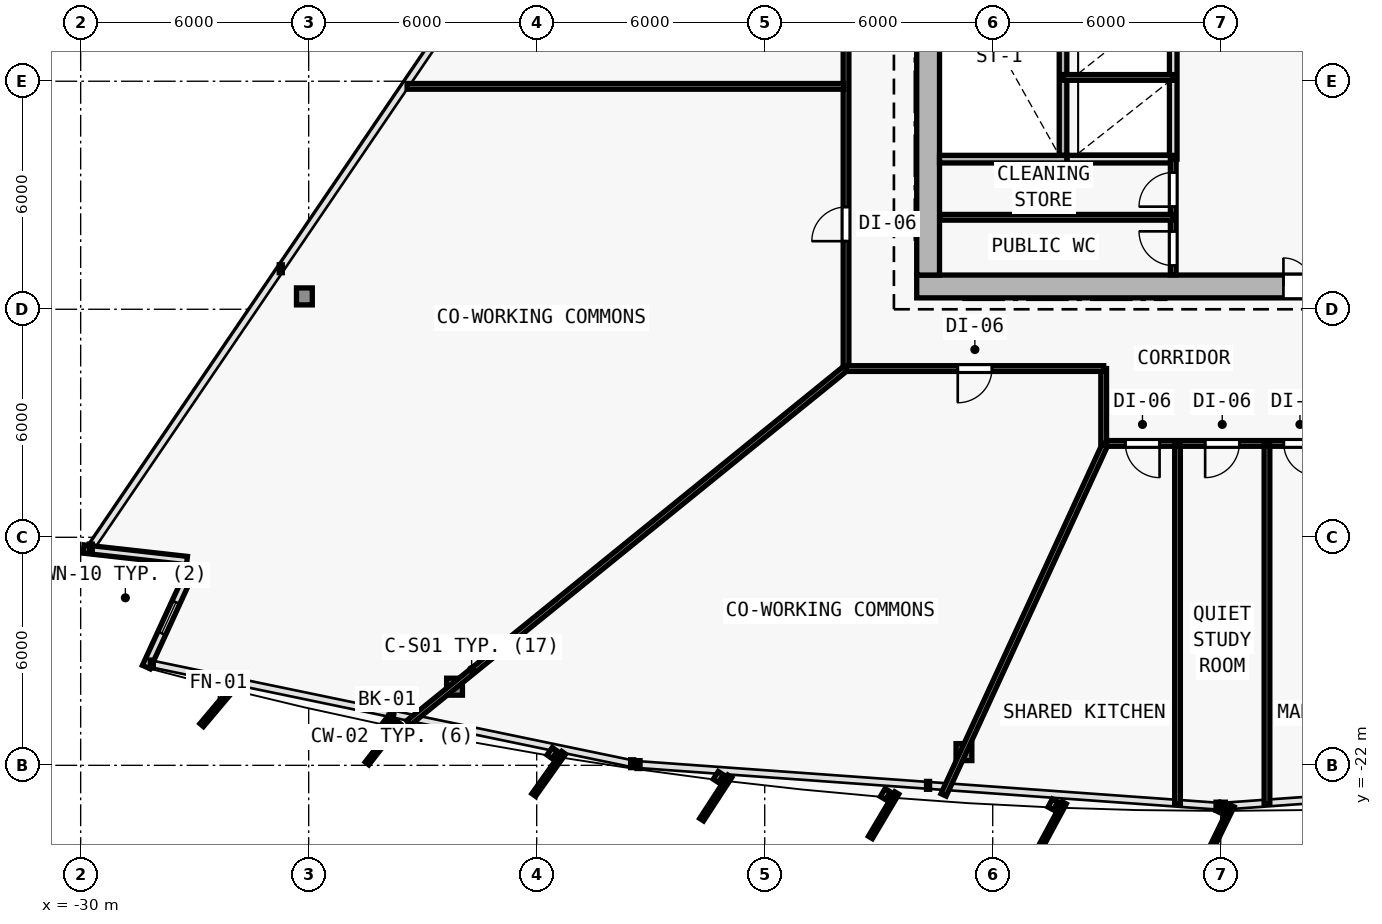
"""IFC4 building model, lengths in metres.
Left out: names, types, materials, properties, quantities, classifications, styles, units other than length and angle.
Written with IfcOpenShell. Run it as: python <this file> out.ifc"""

import sys

from ifc_helpers import new_model, si_unit, direction, frame, frame_2d, origin, origin_2d, place, context, subcontext, project, spatial, rectangle, i_section, extrude, element, fill, save


model = new_model("IFC4")
c1 = context("Model", 3, precision=1e-05, world=origin(), true_north=direction((0.0, 1.0)))
c2 = subcontext(c1, "Body", "Model", "MODEL_VIEW")
j1 = project(units=[si_unit("LENGTHUNIT", "METRE"), si_unit("PLANEANGLEUNIT", "RADIAN")], contexts=[c1])
p1 = place(None, origin())
s1 = spatial("IfcSite", under=j1, at=p1, CompositionType="ELEMENT")
p2 = place(p1, origin())
s2 = spatial("IfcBuilding", under=s1, at=p2, CompositionType="ELEMENT")
p3 = place(p2, frame((0.0, 0.0, 37.2)))
s3 = spatial("IfcBuildingStorey", under=s2, at=p3, CompositionType="ELEMENT", Elevation=37.2)
for number, where, z_axis, x_axis in (
    (1, (-7.7, -9.4, 0.0), (0.0, 0.0, 1.0), (1.0, 0.0, 0.0)),
    (2, (0.0, -9.4, 0.0), (0.0, 0.0, 1.0), (1.0, 0.0, 0.0)),
):
    element("IfcColumn", number, at=place(p3, frame(where, z_axis=z_axis, x_axis=x_axis)), inside=s3, PredefinedType="COLUMN", context=c2, shape_type="SweptSolid", body=[
        extrude(i_section(OverallWidth=0.416, OverallDepth=0.446, WebThickness=0.025, FlangeThickness=0.04, FilletRadius=0.015, at=origin_2d()), origin(), (0.0, 0.0, 1.0), 3.6),
    ])
p4 = place(p3, frame((-20.162, -19.931, 0.006), z_axis=(0.020664238418, 0.033511412961, 0.999224686671), x_axis=(-0.851183725565, 0.524867855115, 0.0)))
e3 = element("IfcColumn", 3, at=p4, inside=s3, PredefinedType="COLUMN", context=c2, shape_type="SweptSolid", body=[
    extrude(i_section(OverallWidth=0.416, OverallDepth=0.446, WebThickness=0.025, FlangeThickness=0.04, FilletRadius=0.015, at=origin_2d()), origin(), (0.0, 0.0, 1.0), 3.592),
])
p5 = place(p3, frame((-6.757, -21.652, 0.006), z_axis=(0.006934288159, 0.035283289748, 0.999353293441), x_axis=(-0.981229659911, 0.192842823335, 0.0)))
e4 = element("IfcColumn", 4, at=p5, inside=s3, PredefinedType="COLUMN", context=c2, shape_type="SweptSolid", body=[
    extrude(i_section(OverallWidth=0.416, OverallDepth=0.446, WebThickness=0.025, FlangeThickness=0.04, FilletRadius=0.015, at=origin_2d()), origin(), (0.0, 0.0, 1.0), 3.591),
])
p6 = place(p3, frame((-24.113, -9.662, 0.006), z_axis=(0.025224163578, 0.021620711639, 0.999447990843), x_axis=(-0.650791373456, 0.759256602365, 0.0)))
e5 = element("IfcColumn", 5, at=p6, inside=s3, PredefinedType="COLUMN", context=c2, shape_type="SweptSolid", body=[
    extrude(i_section(OverallWidth=0.416, OverallDepth=0.446, WebThickness=0.025, FlangeThickness=0.04, FilletRadius=0.015, at=origin_2d()), origin(), (0.0, 0.0, 1.0), 3.591),
])
p7 = place(p3, frame((-27.202, -16.612, 0.0), z_axis=(0.0, 0.0, 1.0), x_axis=(-0.993822658088, 0.110979837223, 0.0)))
e6 = element("IfcWall", 6, at=p7, inside=s3, PredefinedType="SOLIDWALL", context=c2, shape_type="SweptSolid", body=[
    extrude(rectangle(XDim=2.737, YDim=0.22, at=frame_2d((1.368, 0.0))), origin(), (0.0, 0.0, 1.0), 3.35),
])
p8 = place(p3, frame((-28.274, -19.414, 0.0), z_axis=(0.0, 0.0, 1.0), x_axis=(0.417521186742, 0.908667188041, 0.0)))
e7 = element("IfcWall", 7, at=p8, inside=s3, PredefinedType="SOLIDWALL", context=c2, shape_type="SweptSolid", body=[
    extrude(rectangle(XDim=2.852, YDim=0.22, at=frame_2d((1.426, 0.0))), origin(), (0.0, 0.0, 1.0), 3.35),
])
p9 = place(p8, frame((0.976, 0.0, 0.62)))
e8 = element("IfcOpeningElement", 8, at=p9, cuts=e7, PredefinedType="OPENING", context=c2, shape_type="SweptSolid", body=[
    extrude(rectangle(XDim=0.9, YDim=1.6, at=frame_2d((0.45, 0.8))), frame((0.0, 0.12, 0.0), z_axis=(0.0, -1.0, 0.0), x_axis=(1.0, 0.0, 0.0)), (0.0, 0.0, 1.0), 0.24),
])
p10 = place(p3, frame((-8.0, -9.4, 0.0), z_axis=(0.0, 0.0, 1.0), x_axis=(1.0, 0.0, 0.0)))
e9 = element("IfcWall", 9, at=p10, inside=s3, PredefinedType="SHEAR", context=c2, shape_type="SweptSolid", body=[
    extrude(rectangle(XDim=16.0, YDim=0.6, at=frame_2d((8.0, 0.0))), origin(), (0.0, 0.0, 1.0), 3.35),
])
p11 = place(p10, frame((9.65, 0.0, 0.0)))
e10 = element("IfcOpeningElement", 10, at=p11, cuts=e9, PredefinedType="OPENING", context=c2, shape_type="SweptSolid", body=[
    extrude(rectangle(XDim=1.5, YDim=2.2, at=frame_2d((0.75, 1.1))), frame((0.0, 0.31, 0.0), z_axis=(0.0, -1.0, 0.0), x_axis=(1.0, 0.0, 0.0)), (0.0, 0.0, 1.0), 0.62),
])
p12 = place(p3, frame((-7.7, -9.1, 0.0), z_axis=(0.0, 0.0, 1.0), x_axis=(0.0, 1.0, 0.0)))
e11 = element("IfcWall", 11, at=p12, inside=s3, PredefinedType="SHEAR", context=c2, shape_type="SweptSolid", body=[
    extrude(rectangle(XDim=19.0, YDim=0.6, at=frame_2d((9.5, 0.0))), origin(), (0.0, 0.0, 1.0), 3.35),
])
p13 = place(p12, frame((12.65, 0.0, 0.0)))
e12 = element("IfcOpeningElement", 12, at=p13, cuts=e11, PredefinedType="OPENING", context=c2, shape_type="SweptSolid", body=[
    extrude(rectangle(XDim=1.1, YDim=2.15, at=frame_2d((0.55, 1.075))), frame((0.0, 0.31, 0.0), z_axis=(0.0, -1.0, 0.0), x_axis=(1.0, 0.0, 0.0)), (0.0, 0.0, 1.0), 0.62),
])
p14 = place(p3, frame((-4.15, -5.95, 0.0), z_axis=(0.0, 0.0, 1.0), x_axis=(0.0, 1.0, 0.0)))
e13 = element("IfcWall", 13, at=p14, inside=s3, PredefinedType="SOLIDWALL", context=c2, shape_type="SweptSolid", body=[
    extrude(rectangle(XDim=7.2, YDim=0.2, at=frame_2d((3.6, 0.0))), origin(), (0.0, 0.0, 1.0), 3.35),
])
p15 = place(p3, frame((-1.25, -6.05, 0.0), z_axis=(0.0, 0.0, 1.0), x_axis=(0.0, 1.0, 0.0)))
e14 = element("IfcWall", 14, at=p15, inside=s3, PredefinedType="SOLIDWALL", context=c2, shape_type="SweptSolid", body=[
    extrude(rectangle(XDim=8.7, YDim=0.2, at=frame_2d((4.35, 0.0))), origin(), (0.0, 0.0, 1.0), 3.35),
])
p16 = place(p3, frame((-4.15, -3.9, 0.0), z_axis=(0.0, 0.0, 1.0), x_axis=(1.0, 0.0, 0.0)))
e15 = element("IfcWall", 15, at=p16, inside=s3, PredefinedType="PARTITIONING", context=c2, shape_type="SweptSolid", body=[
    extrude(rectangle(XDim=2.9, YDim=0.15, at=frame_2d((1.45, 0.0))), origin(), (0.0, 0.0, 1.0), 3.35),
])
p17 = place(p3, frame((-7.4, -6.05, 0.0), z_axis=(0.0, 0.0, 1.0), x_axis=(1.0, 0.0, 0.0)))
e16 = element("IfcWall", 16, at=p17, inside=s3, PredefinedType="SOLIDWALL", context=c2, shape_type="SweptSolid", body=[
    extrude(rectangle(XDim=3.35, YDim=0.2, at=frame_2d((1.675, 0.0))), origin(), (0.0, 0.0, 1.0), 3.35),
])
p18 = place(p3, frame((-4.04, -6.05, 0.0), z_axis=(0.0, 0.0, 1.0), x_axis=(1.0, 0.0, 0.0)))
e17 = element("IfcWall", 17, at=p18, inside=s3, PredefinedType="SOLIDWALL", context=c2, shape_type="SweptSolid", body=[
    extrude(rectangle(XDim=2.79, YDim=0.2, at=frame_2d((1.395, 0.0))), origin(), (0.0, 0.0, 1.0), 3.35),
])
p19 = place(p3, frame((-1.25, -9.095, 0.0), z_axis=(0.0, 0.0, 1.0), x_axis=(0.0, 1.0, 0.0)))
e18 = element("IfcWall", 18, at=p19, inside=s3, PredefinedType="PARTITIONING", context=c2, shape_type="SweptSolid", body=[
    extrude(rectangle(XDim=3.045, YDim=0.15, at=frame_2d((1.522, 0.0))), origin(), (0.0, 0.0, 1.0), 3.35),
])
p20 = place(p19, frame((1.795, 0.0, 0.0)))
e19 = element("IfcOpeningElement", 19, at=p20, cuts=e18, PredefinedType="OPENING", context=c2, shape_type="SweptSolid", body=[
    extrude(rectangle(XDim=0.9, YDim=2.1, at=frame_2d((0.45, 1.05))), frame((0.0, 0.085, 0.0), z_axis=(0.0, -1.0, 0.0), x_axis=(1.0, 0.0, 0.0)), (0.0, 0.0, 1.0), 0.17),
])
p21 = place(p19, frame((0.245, 0.0, 0.0)))
e20 = element("IfcOpeningElement", 20, at=p21, cuts=e18, PredefinedType="OPENING", context=c2, shape_type="SweptSolid", body=[
    extrude(rectangle(XDim=0.9, YDim=2.1, at=frame_2d((0.45, 1.05))), frame((0.0, 0.085, 0.0), z_axis=(0.0, -1.0, 0.0), x_axis=(1.0, 0.0, 0.0)), (0.0, 0.0, 1.0), 0.17),
])
p22 = place(p3, frame((-7.395, -7.58, 0.0), z_axis=(0.0, 0.0, 1.0), x_axis=(1.0, 0.0, 0.0)))
e21 = element("IfcWall", 21, at=p22, inside=s3, PredefinedType="PARTITIONING", context=c2, shape_type="SweptSolid", body=[
    extrude(rectangle(XDim=6.145, YDim=0.15, at=frame_2d((3.073, 0.0))), origin(), (0.0, 0.0, 1.0), 3.35),
])
p23 = place(p3, frame((-9.86, -11.56, 0.0), z_axis=(0.0, 0.0, 1.0), x_axis=(0.0, 1.0, 0.0)))
e22 = element("IfcWall", 22, at=p23, inside=s3, PredefinedType="PARTITIONING", context=c2, shape_type="SweptSolid", body=[
    extrude(rectangle(XDim=19.986, YDim=0.15, at=frame_2d((9.993, 0.0))), origin(), (0.0, 0.0, 1.0), 2.609),
])
p24 = place(p23, frame((10.179, 0.0, 0.0)))
e23 = element("IfcOpeningElement", 23, at=p24, cuts=e22, PredefinedType="OPENING", context=c2, shape_type="SweptSolid", body=[
    extrude(rectangle(XDim=0.9, YDim=2.1, at=frame_2d((0.45, 1.05))), frame((0.0, 0.085, 0.0), z_axis=(0.0, -1.0, 0.0), x_axis=(1.0, 0.0, 0.0)), (0.0, 0.0, 1.0), 0.17),
])
p25 = place(p23, frame((3.352, 0.0, 0.0)))
e24 = element("IfcOpeningElement", 24, at=p25, cuts=e22, PredefinedType="OPENING", context=c2, shape_type="SweptSolid", body=[
    extrude(rectangle(XDim=0.9, YDim=2.1, at=frame_2d((0.45, 1.05))), frame((0.0, 0.085, 0.0), z_axis=(0.0, -1.0, 0.0), x_axis=(1.0, 0.0, 0.0)), (0.0, 0.0, 1.0), 0.17),
])
p26 = place(p23, frame((17.961, 0.0, 0.0)))
e25 = element("IfcOpeningElement", 25, at=p26, cuts=e22, PredefinedType="OPENING", context=c2, shape_type="SweptSolid", body=[
    extrude(rectangle(XDim=0.9, YDim=2.1, at=frame_2d((0.45, 1.05))), frame((0.0, 0.085, 0.0), z_axis=(0.0, -1.0, 0.0), x_axis=(1.0, 0.0, 0.0)), (0.0, 0.0, 1.0), 0.17),
])
p27 = place(p23, frame((14.974, 0.0, 0.0)))
e26 = element("IfcOpeningElement", 26, at=p27, cuts=e22, PredefinedType="OPENING", context=c2, shape_type="SweptSolid", body=[
    extrude(rectangle(XDim=0.9, YDim=2.1, at=frame_2d((0.45, 1.05))), frame((0.0, 0.085, 0.0), z_axis=(0.0, -1.0, 0.0), x_axis=(1.0, 0.0, 0.0)), (0.0, 0.0, 1.0), 0.17),
])
p28 = place(p3, frame((3.08, -13.53, 0.0), z_axis=(0.0, 0.0, 1.0), x_axis=(-1.0, 0.0, 0.0)))
e27 = element("IfcWall", 27, at=p28, inside=s3, PredefinedType="PARTITIONING", context=c2, shape_type="SweptSolid", body=[
    extrude(rectangle(XDim=6.16, YDim=0.15, at=frame_2d((3.08, 0.0))), origin(), (0.0, 0.0, 1.0), 2.725),
])
p29 = place(p28, frame((4.69, 0.0, 0.0)))
e28 = element("IfcOpeningElement", 28, at=p29, cuts=e27, PredefinedType="OPENING", context=c2, shape_type="SweptSolid", body=[
    extrude(rectangle(XDim=0.9, YDim=2.1, at=frame_2d((0.45, 1.05))), frame((0.0, 0.085, 0.0), z_axis=(0.0, -1.0, 0.0), x_axis=(1.0, 0.0, 0.0)), (0.0, 0.0, 1.0), 0.17),
])
p30 = place(p28, frame((2.591, 0.0, 0.0)))
e29 = element("IfcOpeningElement", 29, at=p30, cuts=e27, PredefinedType="OPENING", context=c2, shape_type="SweptSolid", body=[
    extrude(rectangle(XDim=0.9, YDim=2.1, at=frame_2d((0.45, 1.05))), frame((0.0, 0.085, 0.0), z_axis=(0.0, -1.0, 0.0), x_axis=(1.0, 0.0, 0.0)), (0.0, 0.0, 1.0), 0.17),
])
p31 = place(p28, frame((0.571, 0.0, 0.0)))
e30 = element("IfcOpeningElement", 30, at=p31, cuts=e27, PredefinedType="OPENING", context=c2, shape_type="SweptSolid", body=[
    extrude(rectangle(XDim=0.85, YDim=2.1, at=frame_2d((0.425, 1.05))), frame((0.0, 0.085, 0.0), z_axis=(0.0, -1.0, 0.0), x_axis=(1.0, 0.0, 0.0)), (0.0, 0.0, 1.0), 0.17),
])
p32 = place(p3, frame((-3.08, -13.53, 0.0), z_axis=(0.0, 0.0, 1.0), x_axis=(0.0, 1.0, 0.0)))
e31 = element("IfcWall", 31, at=p32, inside=s3, PredefinedType="PARTITIONING", context=c2, shape_type="SweptSolid", body=[
    extrude(rectangle(XDim=1.97, YDim=0.15, at=frame_2d((0.985, 0.0))), origin(), (0.0, 0.0, 1.0), 2.825),
])
p33 = place(p3, frame((-3.08, -11.56, 0.0), z_axis=(0.0, 0.0, 1.0), x_axis=(-1.0, 0.0, 0.0)))
e32 = element("IfcWall", 32, at=p33, inside=s3, PredefinedType="PARTITIONING", context=c2, shape_type="SweptSolid", body=[
    extrude(rectangle(XDim=6.78, YDim=0.15, at=frame_2d((3.39, 0.0))), origin(), (0.0, 0.0, 1.0), 2.609),
])
p34 = place(p33, frame((2.94, 0.0, 0.0)))
e33 = element("IfcOpeningElement", 33, at=p34, cuts=e32, PredefinedType="OPENING", context=c2, shape_type="SweptSolid", body=[
    extrude(rectangle(XDim=0.9, YDim=2.1, at=frame_2d((0.45, 1.05))), frame((0.0, 0.085, 0.0), z_axis=(0.0, -1.0, 0.0), x_axis=(1.0, 0.0, 0.0)), (0.0, 0.0, 1.0), 0.17),
])
p35 = place(p3, frame((-9.888, -11.569, 0.0), z_axis=(0.0, 0.0, 1.0), x_axis=(-0.776684167017, -0.629890232267, 0.0)))
e34 = element("IfcWall", 34, at=p35, inside=s3, PredefinedType="PARTITIONING", context=c2, shape_type="SweptSolid", body=[
    extrude(rectangle(XDim=14.792, YDim=0.15, at=frame_2d((7.396, 0.0))), origin(), (0.0, 0.0, 1.0), 2.609),
])
p36 = place(p3, frame((-3.053, -13.579, 0.0), z_axis=(0.0, 0.0, 1.0), x_axis=(-0.418565952327, -0.908186403528, 0.0)))
e35 = element("IfcWall", 35, at=p36, inside=s3, PredefinedType="PARTITIONING", context=c2, shape_type="SweptSolid", body=[
    extrude(rectangle(XDim=10.129, YDim=0.15, at=frame_2d((5.064, 0.0))), origin(), (0.0, 0.0, 1.0), 2.725),
])
p37 = place(p3, frame((-1.137, -13.59, 0.0), z_axis=(0.0, 0.0, 1.0), x_axis=(0.0, -1.0, 0.0)))
e36 = element("IfcWall", 36, at=p37, inside=s3, PredefinedType="PARTITIONING", context=c2, shape_type="SweptSolid", body=[
    extrude(rectangle(XDim=9.428, YDim=0.15, at=frame_2d((4.714, 0.0))), origin(), (0.0, 0.0, 1.0), 2.735),
])
p38 = place(p3, frame((-9.92, -4.135, 0.0), z_axis=(0.0, 0.0, 1.0), x_axis=(-1.0, 0.0, 0.0)))
e37 = element("IfcWall", 37, at=p38, inside=s3, PredefinedType="PARTITIONING", context=c2, shape_type="SweptSolid", body=[
    extrude(rectangle(XDim=11.49, YDim=0.15, at=frame_2d((5.745, 0.0))), origin(), (0.0, 0.0, 1.0), 2.735),
])
p39 = place(p3, frame((1.217, -13.59, 0.0), z_axis=(0.0, 0.0, 1.0), x_axis=(0.0, -1.0, 0.0)))
e38 = element("IfcWall", 38, at=p39, inside=s3, PredefinedType="PARTITIONING", context=c2, shape_type="SweptSolid", body=[
    extrude(rectangle(XDim=9.427, YDim=0.15, at=frame_2d((4.714, 0.0))), origin(), (0.0, 0.0, 1.0), 2.735),
])
p40 = place(p9, origin())
e39 = element("IfcWindow", 39, at=p40, inside=s3, PartitioningType="SINGLE_PANEL", PredefinedType="WINDOW", context=c2, shape_type="SweptSolid", body=[
    extrude(rectangle(XDim=0.9, YDim=1.6, at=frame_2d((0.45, 0.8))), frame((0.0, 0.03, 0.0), z_axis=(0.0, -1.0, 0.0), x_axis=(1.0, 0.0, 0.0)), (0.0, 0.0, 1.0), 0.06),
])
fill(e8, e39)
p41 = place(p11, origin())
e40 = element("IfcDoor", 40, at=p41, inside=s3, OperationType="DOUBLE_DOOR_SINGLE_SWING", PredefinedType="DOOR", context=c2, shape_type="SweptSolid", body=[
    extrude(rectangle(XDim=1.5, YDim=2.2, at=frame_2d((0.75, 1.1))), frame((0.0, 0.025, 0.0), z_axis=(0.0, -1.0, 0.0), x_axis=(1.0, 0.0, 0.0)), (0.0, 0.0, 1.0), 0.05),
])
fill(e10, e40)
p42 = place(p20, origin())
e41 = element("IfcDoor", 41, at=p42, inside=s3, OperationType="SINGLE_SWING_LEFT", PredefinedType="DOOR", context=c2, shape_type="SweptSolid", body=[
    extrude(rectangle(XDim=0.9, YDim=2.1, at=frame_2d((0.45, 1.05))), frame((0.0, 0.025, 0.0), z_axis=(0.0, -1.0, 0.0), x_axis=(1.0, 0.0, 0.0)), (0.0, 0.0, 1.0), 0.05),
])
fill(e19, e41)
p43 = place(p21, origin())
e42 = element("IfcDoor", 42, at=p43, inside=s3, OperationType="SINGLE_SWING_RIGHT", PredefinedType="DOOR", context=c2, shape_type="SweptSolid", body=[
    extrude(rectangle(XDim=0.9, YDim=2.1, at=frame_2d((0.45, 1.05))), frame((0.0, 0.025, 0.0), z_axis=(0.0, -1.0, 0.0), x_axis=(1.0, 0.0, 0.0)), (0.0, 0.0, 1.0), 0.05),
])
fill(e20, e42)
p44 = place(p25, origin())
e43 = element("IfcDoor", 43, at=p44, inside=s3, OperationType="SINGLE_SWING_LEFT", PredefinedType="DOOR", context=c2, shape_type="SweptSolid", body=[
    extrude(rectangle(XDim=0.9, YDim=2.1, at=frame_2d((0.45, 1.05))), frame((0.0, 0.025, 0.0), z_axis=(0.0, -1.0, 0.0), x_axis=(1.0, 0.0, 0.0)), (0.0, 0.0, 1.0), 0.05),
])
fill(e24, e43)
p45 = place(p34, origin())
e44 = element("IfcDoor", 44, at=p45, inside=s3, OperationType="SINGLE_SWING_RIGHT", PredefinedType="DOOR", context=c2, shape_type="SweptSolid", body=[
    extrude(rectangle(XDim=0.9, YDim=2.1, at=frame_2d((0.45, 1.05))), frame((0.0, 0.025, 0.0), z_axis=(0.0, -1.0, 0.0), x_axis=(1.0, 0.0, 0.0)), (0.0, 0.0, 1.0), 0.05),
])
fill(e33, e44)
p46 = place(p29, origin())
e45 = element("IfcDoor", 45, at=p46, inside=s3, OperationType="SINGLE_SWING_LEFT", PredefinedType="DOOR", context=c2, shape_type="SweptSolid", body=[
    extrude(rectangle(XDim=0.9, YDim=2.1, at=frame_2d((0.45, 1.05))), frame((0.0, 0.025, 0.0), z_axis=(0.0, -1.0, 0.0), x_axis=(1.0, 0.0, 0.0)), (0.0, 0.0, 1.0), 0.05),
])
fill(e28, e45)
p47 = place(p30, origin())
e46 = element("IfcDoor", 46, at=p47, inside=s3, OperationType="SINGLE_SWING_RIGHT", PredefinedType="DOOR", context=c2, shape_type="SweptSolid", body=[
    extrude(rectangle(XDim=0.9, YDim=2.1, at=frame_2d((0.45, 1.05))), frame((0.0, 0.025, 0.0), z_axis=(0.0, -1.0, 0.0), x_axis=(1.0, 0.0, 0.0)), (0.0, 0.0, 1.0), 0.05),
])
fill(e29, e46)
p48 = place(p31, origin())
e47 = element("IfcDoor", 47, at=p48, inside=s3, OperationType="SINGLE_SWING_LEFT", PredefinedType="DOOR", context=c2, shape_type="SweptSolid", body=[
    extrude(rectangle(XDim=0.85, YDim=2.1, at=frame_2d((0.425, 1.05))), frame((0.0, 0.025, 0.0), z_axis=(0.0, -1.0, 0.0), x_axis=(1.0, 0.0, 0.0)), (0.0, 0.0, 1.0), 0.05),
])
fill(e30, e47)
save(model, sys.argv[1])
